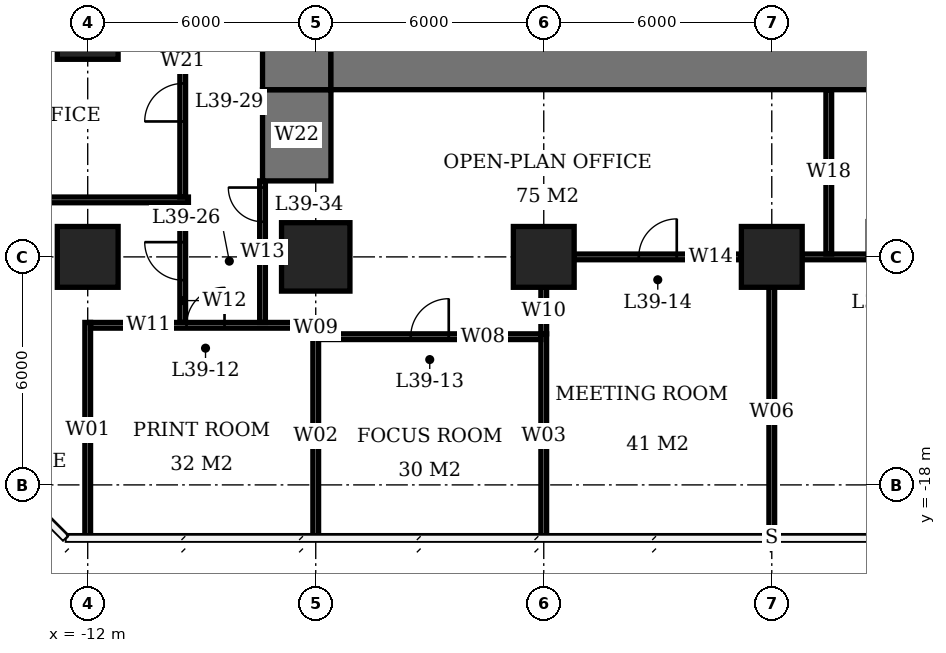
"""IFC4 building model, lengths in metres.
Left out: names, types, materials, properties, quantities, classifications, styles, units other than length and angle.
Written with IfcOpenShell. Run it as: python <this file> out.ifc"""

import sys

from ifc_helpers import new_model, si_unit, direction, frame, frame_2d, origin, origin_2d, place, context, subcontext, project, spatial, rectangle, extrude, element, fill, save


model = new_model("IFC4")
c1 = context("Model", 3, precision=1e-05, world=origin(), true_north=direction((0.0, 1.0)))
c2 = subcontext(c1, "Body", "Model", "MODEL_VIEW")
j1 = project(units=[si_unit("LENGTHUNIT", "METRE"), si_unit("PLANEANGLEUNIT", "RADIAN")], contexts=[c1])
p1 = place(None, origin())
s1 = spatial("IfcSite", under=j1, at=p1, CompositionType="ELEMENT")
p2 = place(p1, origin())
s2 = spatial("IfcBuilding", under=s1, at=p2, CompositionType="ELEMENT")
p3 = place(p2, frame((0.0, 0.0, 160.1)))
s3 = spatial("IfcBuildingStorey", under=s2, at=p3, CompositionType="ELEMENT", Elevation=160.1)
for number, where, z_axis, x_axis in (
    (1, (-12.0, -12.0, 0.0), (0.0, 0.0, 1.0), (1.0, 0.0, 0.0)),
    (2, (-12.0, -6.0, 0.0), (0.0, 0.0, 1.0), (1.0, 0.0, 0.0)),
):
    element("IfcColumn", number, at=place(p3, frame(where, z_axis=z_axis, x_axis=x_axis)), inside=s3, PredefinedType="COLUMN", context=c2, shape_type="SweptSolid", body=[
        extrude(rectangle(XDim=1.6, YDim=1.6, at=origin_2d()), origin(), (0.0, 0.0, 1.0), 3.9),
    ])
p4 = place(p3, frame((-6.0, -12.0, 0.0), z_axis=(0.0, 0.0, 1.0), x_axis=(1.0, 0.0, 0.0)))
e3 = element("IfcColumn", 3, at=p4, inside=s3, PredefinedType="COLUMN", context=c2, shape_type="SweptSolid", body=[
    extrude(rectangle(XDim=1.8, YDim=1.8, at=origin_2d()), origin(), (0.0, 0.0, 1.0), 3.9),
])
for number, where, z_axis, x_axis in (
    (4, (0.0, -12.0, 0.0), (0.0, 0.0, 1.0), (1.0, 0.0, 0.0)),
    (5, (6.0, -12.0, 0.0), (0.0, 0.0, 1.0), (1.0, 0.0, 0.0)),
):
    element("IfcColumn", number, at=place(p3, frame(where, z_axis=z_axis, x_axis=x_axis)), inside=s3, PredefinedType="COLUMN", context=c2, shape_type="SweptSolid", body=[
        extrude(rectangle(XDim=1.6, YDim=1.6, at=origin_2d()), origin(), (0.0, 0.0, 1.0), 3.9),
    ])
p5 = place(p3, frame((-5.6, -6.6, 0.0), z_axis=(0.0, 0.0, 1.0), x_axis=(1.0, 0.0, 0.0)))
e6 = element("IfcWall", 6, at=p5, inside=s3, PredefinedType="SHEAR", context=c2, shape_type="SweptSolid", body=[
    extrude(rectangle(XDim=23.2, YDim=2.0, at=frame_2d((11.6, 0.0))), origin(), (0.0, 0.0, 1.0), 3.9),
])
p6 = place(p3, frame((-6.5, -7.6, 0.0), z_axis=(0.0, 0.0, 1.0), x_axis=(0.0, 1.0, 0.0)))
e7 = element("IfcWall", 7, at=p6, inside=s3, PredefinedType="SHEAR", context=c2, shape_type="SweptSolid", body=[
    extrude(rectangle(XDim=21.2, YDim=1.8, at=frame_2d((10.6, 0.0))), origin(), (0.0, 0.0, 1.0), 3.9),
])
p7 = place(p6, frame((7.8, 0.0, 0.0)))
e8 = element("IfcOpeningElement", 8, at=p7, cuts=e7, PredefinedType="OPENING", context=c2, shape_type="SweptSolid", body=[
    extrude(rectangle(XDim=1.8, YDim=2.4, at=frame_2d((0.9, 1.2))), frame((0.0, 0.91, 0.0), z_axis=(0.0, -1.0, 0.0), x_axis=(1.0, 0.0, 0.0)), (0.0, 0.0, 1.0), 1.82),
])
p8 = place(p3, frame((-6.5, -10.0, 0.0), z_axis=(0.0, 0.0, 1.0), x_axis=(0.0, 1.0, 0.0)))
e9 = element("IfcWall", 9, at=p8, inside=s3, PredefinedType="SHEAR", context=c2, shape_type="SweptSolid", body=[
    extrude(rectangle(XDim=2.4, YDim=1.8, at=frame_2d((1.2, 0.0))), origin(), (0.0, 0.0, 1.0), 3.9),
])
p9 = place(p3, frame((-5.925, -14.1, 0.0), z_axis=(0.0, 0.0, 1.0), x_axis=(1.0, 0.0, 0.0)))
e10 = element("IfcWall", 10, at=p9, inside=s3, PredefinedType="PARTITIONING", context=c2, shape_type="SweptSolid", body=[
    extrude(rectangle(XDim=5.85, YDim=0.15, at=frame_2d((2.925, 0.0))), origin(), (0.0, 0.0, 1.0), 3.65),
])
p10 = place(p9, frame((2.425, 0.0, 0.0)))
e11 = element("IfcOpeningElement", 11, at=p10, cuts=e10, PredefinedType="OPENING", context=c2, shape_type="SweptSolid", body=[
    extrude(rectangle(XDim=1.0, YDim=2.1, at=frame_2d((0.5, 1.05))), frame((0.0, 0.085, 0.0), z_axis=(0.0, -1.0, 0.0), x_axis=(1.0, 0.0, 0.0)), (0.0, 0.0, 1.0), 0.17),
])
p11 = place(p3, frame((-11.925, -13.8, 0.0), z_axis=(0.0, 0.0, 1.0), x_axis=(1.0, 0.0, 0.0)))
e12 = element("IfcWall", 12, at=p11, inside=s3, PredefinedType="PARTITIONING", context=c2, shape_type="SweptSolid", body=[
    extrude(rectangle(XDim=5.85, YDim=0.15, at=frame_2d((2.925, 0.0))), origin(), (0.0, 0.0, 1.0), 3.65),
])
p12 = place(p11, frame((2.525, 0.0, 0.0)))
e13 = element("IfcOpeningElement", 13, at=p12, cuts=e12, PredefinedType="OPENING", context=c2, shape_type="SweptSolid", body=[
    extrude(rectangle(XDim=1.0, YDim=2.1, at=frame_2d((0.5, 1.05))), frame((0.0, 0.085, 0.0), z_axis=(0.0, -1.0, 0.0), x_axis=(1.0, 0.0, 0.0)), (0.0, 0.0, 1.0), 0.17),
])
p13 = place(p3, frame((0.8, -12.0, 0.0), z_axis=(0.0, 0.0, 1.0), x_axis=(1.0, 0.0, 0.0)))
e14 = element("IfcWall", 14, at=p13, inside=s3, PredefinedType="PARTITIONING", context=c2, shape_type="SweptSolid", body=[
    extrude(rectangle(XDim=4.4, YDim=0.15, at=frame_2d((2.2, 0.0))), origin(), (0.0, 0.0, 1.0), 3.65),
])
p14 = place(p13, frame((1.7, 0.0, 0.0)))
e15 = element("IfcOpeningElement", 15, at=p14, cuts=e14, PredefinedType="OPENING", context=c2, shape_type="SweptSolid", body=[
    extrude(rectangle(XDim=1.0, YDim=2.1, at=frame_2d((0.5, 1.05))), frame((0.0, 0.085, 0.0), z_axis=(0.0, -1.0, 0.0), x_axis=(1.0, 0.0, 0.0)), (0.0, 0.0, 1.0), 0.17),
])
p15 = place(p3, frame((6.8, -12.0, 0.0), z_axis=(0.0, 0.0, 1.0), x_axis=(1.0, 0.0, 0.0)))
e16 = element("IfcWall", 16, at=p15, inside=s3, PredefinedType="PARTITIONING", context=c2, shape_type="SweptSolid", body=[
    extrude(rectangle(XDim=4.4, YDim=0.15, at=frame_2d((2.2, 0.0))), origin(), (0.0, 0.0, 1.0), 3.65),
])
p16 = place(p15, frame((1.7, 0.0, 0.0)))
e17 = element("IfcOpeningElement", 17, at=p16, cuts=e16, PredefinedType="OPENING", context=c2, shape_type="SweptSolid", body=[
    extrude(rectangle(XDim=1.0, YDim=2.1, at=frame_2d((0.5, 1.05))), frame((0.0, 0.085, 0.0), z_axis=(0.0, -1.0, 0.0), x_axis=(1.0, 0.0, 0.0)), (0.0, 0.0, 1.0), 0.17),
])
p17 = place(p3, frame((-12.0, -19.4, 0.0), z_axis=(0.0, 0.0, 1.0), x_axis=(0.0, 1.0, 0.0)))
e18 = element("IfcWall", 18, at=p17, inside=s3, PredefinedType="PARTITIONING", context=c2, shape_type="SweptSolid", body=[
    extrude(rectangle(XDim=5.675, YDim=0.15, at=frame_2d((2.837, 0.0))), origin(), (0.0, 0.0, 1.0), 3.65),
])
p18 = place(p3, frame((-6.0, -19.4, 0.0), z_axis=(0.0, 0.0, 1.0), x_axis=(0.0, 1.0, 0.0)))
e19 = element("IfcWall", 19, at=p18, inside=s3, PredefinedType="PARTITIONING", context=c2, shape_type="SweptSolid", body=[
    extrude(rectangle(XDim=5.375, YDim=0.15, at=frame_2d((2.688, 0.0))), origin(), (0.0, 0.0, 1.0), 3.65),
])
p19 = place(p3, frame((-6.0, -14.025, 0.0), z_axis=(0.0, 0.0, 1.0), x_axis=(0.0, 1.0, 0.0)))
e20 = element("IfcWall", 20, at=p19, inside=s3, PredefinedType="PARTITIONING", context=c2, shape_type="SweptSolid", body=[
    extrude(rectangle(XDim=0.3, YDim=0.15, at=frame_2d((0.15, 0.0))), origin(), (0.0, 0.0, 1.0), 3.65),
])
p20 = place(p3, frame((0.0, -19.4, 0.0), z_axis=(0.0, 0.0, 1.0), x_axis=(0.0, 1.0, 0.0)))
e21 = element("IfcWall", 21, at=p20, inside=s3, PredefinedType="PARTITIONING", context=c2, shape_type="SweptSolid", body=[
    extrude(rectangle(XDim=5.375, YDim=0.15, at=frame_2d((2.688, 0.0))), origin(), (0.0, 0.0, 1.0), 3.65),
])
p21 = place(p3, frame((0.0, -14.025, 0.0), z_axis=(0.0, 0.0, 1.0), x_axis=(0.0, 1.0, 0.0)))
e22 = element("IfcWall", 22, at=p21, inside=s3, PredefinedType="PARTITIONING", context=c2, shape_type="SweptSolid", body=[
    extrude(rectangle(XDim=1.225, YDim=0.15, at=frame_2d((0.612, 0.0))), origin(), (0.0, 0.0, 1.0), 3.65),
])
p22 = place(p3, frame((6.0, -19.35, 0.0), z_axis=(0.0, 0.0, 1.0), x_axis=(0.0, 1.0, 0.0)))
e23 = element("IfcWall", 23, at=p22, inside=s3, PredefinedType="PARTITIONING", context=c2, shape_type="SweptSolid", body=[
    extrude(rectangle(XDim=6.55, YDim=0.15, at=frame_2d((3.275, 0.0))), origin(), (0.0, 0.0, 1.0), 3.65),
])
p23 = place(p3, frame((-19.4, -10.5, 0.0), z_axis=(0.0, 0.0, 1.0), x_axis=(1.0, 0.0, 0.0)))
e24 = element("IfcWall", 24, at=p23, inside=s3, PredefinedType="PARTITIONING", context=c2, shape_type="SweptSolid", body=[
    extrude(rectangle(XDim=10.05, YDim=0.15, at=frame_2d((5.025, 0.0))), origin(), (0.0, 0.0, 1.0), 3.65),
])
p24 = place(p3, frame((-9.5, -13.725, 0.0), z_axis=(0.0, 0.0, 1.0), x_axis=(0.0, 1.0, 0.0)))
e25 = element("IfcWall", 25, at=p24, inside=s3, PredefinedType="PARTITIONING", context=c2, shape_type="SweptSolid", body=[
    extrude(rectangle(XDim=3.15, YDim=0.15, at=frame_2d((1.575, 0.0))), origin(), (0.0, 0.0, 1.0), 3.65),
])
p25 = place(p24, frame((1.113, 0.0, 0.0)))
e26 = element("IfcOpeningElement", 26, at=p25, cuts=e25, PredefinedType="OPENING", context=c2, shape_type="SweptSolid", body=[
    extrude(rectangle(XDim=1.0, YDim=2.1, at=frame_2d((0.5, 1.05))), frame((0.0, 0.085, 0.0), z_axis=(0.0, -1.0, 0.0), x_axis=(1.0, 0.0, 0.0)), (0.0, 0.0, 1.0), 0.17),
])
p26 = place(p3, frame((-9.5, -10.425, 0.0), z_axis=(0.0, 0.0, 1.0), x_axis=(0.0, 1.0, 0.0)))
e27 = element("IfcWall", 27, at=p26, inside=s3, PredefinedType="PARTITIONING", context=c2, shape_type="SweptSolid", body=[
    extrude(rectangle(XDim=7.175, YDim=0.15, at=frame_2d((3.587, 0.0))), origin(), (0.0, 0.0, 1.0), 3.65),
])
p27 = place(p26, frame((1.989, 0.0, 0.0)))
e28 = element("IfcOpeningElement", 28, at=p27, cuts=e27, PredefinedType="OPENING", context=c2, shape_type="SweptSolid", body=[
    extrude(rectangle(XDim=1.0, YDim=2.1, at=frame_2d((0.5, 1.05))), frame((0.0, 0.085, 0.0), z_axis=(0.0, -1.0, 0.0), x_axis=(1.0, 0.0, 0.0)), (0.0, 0.0, 1.0), 0.17),
])
p28 = place(p3, frame((-7.4, -13.725, 0.0), z_axis=(0.0, 0.0, 1.0), x_axis=(0.0, 1.0, 0.0)))
e29 = element("IfcWall", 29, at=p28, inside=s3, PredefinedType="PARTITIONING", context=c2, shape_type="SweptSolid", body=[
    extrude(rectangle(XDim=3.725, YDim=0.15, at=frame_2d((1.863, 0.0))), origin(), (0.0, 0.0, 1.0), 3.65),
])
p29 = place(p28, frame((2.65, 0.0, 0.0)))
e30 = element("IfcOpeningElement", 30, at=p29, cuts=e29, PredefinedType="OPENING", context=c2, shape_type="SweptSolid", body=[
    extrude(rectangle(XDim=0.9, YDim=2.1, at=frame_2d((0.45, 1.05))), frame((0.0, 0.085, 0.0), z_axis=(0.0, -1.0, 0.0), x_axis=(1.0, 0.0, 0.0)), (0.0, 0.0, 1.0), 0.17),
])
p30 = place(p3, frame((7.5, -11.925, 0.0), z_axis=(0.0, 0.0, 1.0), x_axis=(0.0, 1.0, 0.0)))
e31 = element("IfcWall", 31, at=p30, inside=s3, PredefinedType="PARTITIONING", context=c2, shape_type="SweptSolid", body=[
    extrude(rectangle(XDim=4.325, YDim=0.15, at=frame_2d((2.163, 0.0))), origin(), (0.0, 0.0, 1.0), 3.65),
])
p31 = place(p12, origin())
e32 = element("IfcDoor", 32, at=p31, inside=s3, OperationType="SINGLE_SWING_RIGHT", PredefinedType="DOOR", context=c2, shape_type="SweptSolid", body=[
    extrude(rectangle(XDim=1.0, YDim=2.1, at=frame_2d((0.5, 1.05))), frame((0.0, 0.025, 0.0), z_axis=(0.0, -1.0, 0.0), x_axis=(1.0, 0.0, 0.0)), (0.0, 0.0, 1.0), 0.05),
])
fill(e13, e32)
p32 = place(p10, origin())
e33 = element("IfcDoor", 33, at=p32, inside=s3, OperationType="SINGLE_SWING_RIGHT", PredefinedType="DOOR", context=c2, shape_type="SweptSolid", body=[
    extrude(rectangle(XDim=1.0, YDim=2.1, at=frame_2d((0.5, 1.05))), frame((0.0, 0.025, 0.0), z_axis=(0.0, -1.0, 0.0), x_axis=(1.0, 0.0, 0.0)), (0.0, 0.0, 1.0), 0.05),
])
fill(e11, e33)
p33 = place(p14, origin())
e34 = element("IfcDoor", 34, at=p33, inside=s3, OperationType="SINGLE_SWING_RIGHT", PredefinedType="DOOR", context=c2, shape_type="SweptSolid", body=[
    extrude(rectangle(XDim=1.0, YDim=2.1, at=frame_2d((0.5, 1.05))), frame((0.0, 0.025, 0.0), z_axis=(0.0, -1.0, 0.0), x_axis=(1.0, 0.0, 0.0)), (0.0, 0.0, 1.0), 0.05),
])
fill(e15, e34)
p34 = place(p25, origin())
e35 = element("IfcDoor", 35, at=p34, inside=s3, OperationType="SINGLE_SWING_RIGHT", PredefinedType="DOOR", context=c2, shape_type="SweptSolid", body=[
    extrude(rectangle(XDim=1.0, YDim=2.1, at=frame_2d((0.5, 1.05))), frame((0.0, 0.025, 0.0), z_axis=(0.0, -1.0, 0.0), x_axis=(1.0, 0.0, 0.0)), (0.0, 0.0, 1.0), 0.05),
])
fill(e26, e35)
p35 = place(p27, origin())
e36 = element("IfcDoor", 36, at=p35, inside=s3, OperationType="SINGLE_SWING_LEFT", PredefinedType="DOOR", context=c2, shape_type="SweptSolid", body=[
    extrude(rectangle(XDim=1.0, YDim=2.1, at=frame_2d((0.5, 1.05))), frame((0.0, 0.025, 0.0), z_axis=(0.0, -1.0, 0.0), x_axis=(1.0, 0.0, 0.0)), (0.0, 0.0, 1.0), 0.05),
])
fill(e28, e36)
p36 = place(p29, origin())
e37 = element("IfcDoor", 37, at=p36, inside=s3, OperationType="SINGLE_SWING_RIGHT", PredefinedType="DOOR", context=c2, shape_type="SweptSolid", body=[
    extrude(rectangle(XDim=0.9, YDim=2.1, at=frame_2d((0.45, 1.05))), frame((0.0, 0.025, 0.0), z_axis=(0.0, -1.0, 0.0), x_axis=(1.0, 0.0, 0.0)), (0.0, 0.0, 1.0), 0.05),
])
fill(e30, e37)
save(model, sys.argv[1])
